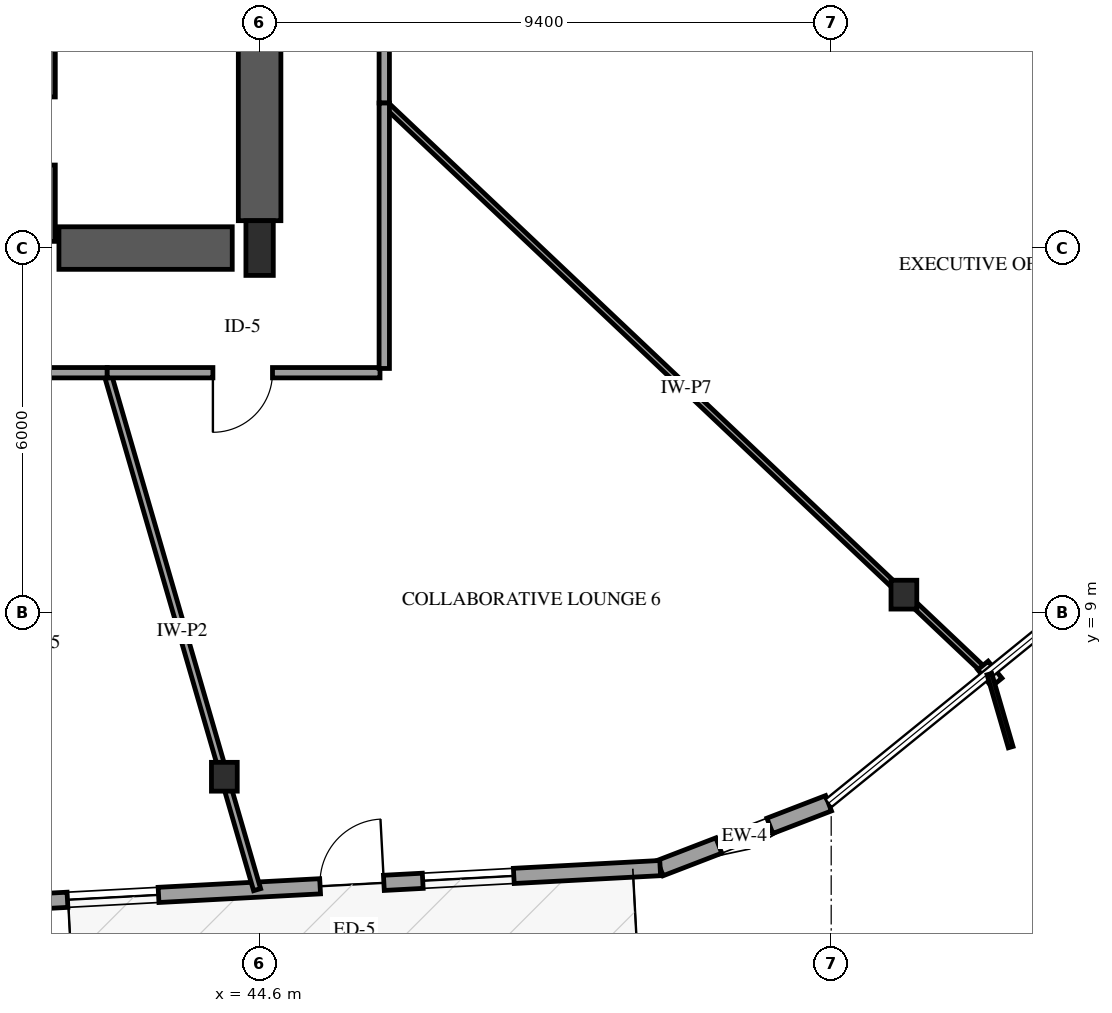
"""IFC4 building model, lengths in metres.
Left out: names, types, materials, properties, quantities, classifications, styles, units other than length and angle.
Written with IfcOpenShell. Run it as: python <this file> out.ifc"""

import sys

from ifc_helpers import new_model, si_unit, direction, frame, frame_2d, origin, origin_2d, place, context, subcontext, project, spatial, rectangle, i_section, extrude, element, fill, save


model = new_model("IFC4")
c1 = context("Model", 3, precision=1e-05, world=origin(), true_north=direction((0.0, 1.0)))
c2 = subcontext(c1, "Body", "Model", "MODEL_VIEW")
j1 = project(units=[si_unit("LENGTHUNIT", "METRE"), si_unit("PLANEANGLEUNIT", "RADIAN")], contexts=[c1])
p1 = place(None, origin())
s1 = spatial("IfcSite", under=j1, at=p1, CompositionType="ELEMENT")
p2 = place(p1, origin())
s2 = spatial("IfcBuilding", under=s1, at=p2, CompositionType="ELEMENT")
p3 = place(p2, frame((0.0, 0.0, 38.6)))
s3 = spatial("IfcBuildingStorey", under=s2, at=p3, CompositionType="ELEMENT", Elevation=38.6)
p4 = place(p3, frame((41.12, 15.11, 0.0), z_axis=(0.0, 0.0, 1.0), x_axis=(0.0, 1.0, 0.0)))
e1 = element("IfcWall", 1, at=p4, inside=s3, PredefinedType="SHEAR", context=c2, shape_type="SweptSolid", body=[
    extrude(rectangle(XDim=3.63, YDim=0.24, at=frame_2d((1.815, 0.0))), origin(), (0.0, 0.0, 1.0), 4.0),
])
p5 = place(p4, frame((1.255, 0.0, 0.0)))
e2 = element("IfcOpeningElement", 2, at=p5, cuts=e1, PredefinedType="OPENING", context=c2, shape_type="SweptSolid", body=[
    extrude(rectangle(XDim=1.12, YDim=2.15, at=frame_2d((0.56, 1.075))), frame((0.0, 0.13, 0.0), z_axis=(0.0, -1.0, 0.0), x_axis=(1.0, 0.0, 0.0)), (0.0, 0.0, 1.0), 0.26),
])
p6 = place(p3, frame((41.3, 15.0, 0.0), z_axis=(0.0, 0.0, 1.0), x_axis=(1.0, 0.0, 0.0)))
e3 = element("IfcWall", 3, at=p6, inside=s3, PredefinedType="SHEAR", context=c2, shape_type="SweptSolid", body=[
    extrude(rectangle(XDim=2.85, YDim=0.7, at=frame_2d((1.425, 0.0))), origin(), (0.0, 0.0, 1.0), 4.0),
])
p7 = place(p3, frame((44.6, 15.45, 0.0), z_axis=(0.0, 0.0, 1.0), x_axis=(0.0, 1.0, 0.0)))
e4 = element("IfcWall", 4, at=p7, inside=s3, PredefinedType="SHEAR", context=c2, shape_type="SweptSolid", body=[
    extrude(rectangle(XDim=6.35, YDim=0.7, at=frame_2d((3.175, 0.0))), origin(), (0.0, 0.0, 1.0), 4.0),
])
p8 = place(p3, frame((44.6, 15.0, 0.0), z_axis=(0.0, 0.0, 1.0), x_axis=(1.0, 0.0, 0.0)))
e5 = element("IfcColumn", 5, at=p8, inside=s3, PredefinedType="PILASTER", context=c2, shape_type="SweptSolid", body=[
    extrude(rectangle(XDim=0.45, YDim=0.9, at=origin_2d()), origin(), (0.0, 0.0, 1.0), 4.0),
])
for number, where, z_axis, x_axis in (
    (6, (44.02, 6.306, 0.0), (0.0, 0.0, 1.0), (1.0, 0.0, 0.0)),
    (7, (55.196, 9.3, 0.0), (0.0, 0.0, 1.0), (1.0, 0.0, 0.0)),
):
    element("IfcColumn", number, at=place(p3, frame(where, z_axis=z_axis, x_axis=x_axis)), inside=s3, PredefinedType="COLUMN", context=c2, shape_type="SweptSolid", body=[
        extrude(i_section(OverallWidth=0.424, OverallDepth=0.474, WebThickness=0.048, FlangeThickness=0.077, FilletRadius=0.038, at=origin_2d()), origin(), (0.0, 0.0, 1.0), 4.0),
    ])
p9 = place(p3, frame((51.188, 4.803, 0.0), z_axis=(0.0, 0.0, 1.0), x_axis=(0.933222533465, 0.35929890486, 0.0)))
e8 = element("IfcWall", 8, at=p9, inside=s3, PredefinedType="SOLIDWALL", context=c2, shape_type="SweptSolid", body=[
    extrude(rectangle(XDim=2.967, YDim=0.27, at=frame_2d((1.483, 0.0))), origin(), (0.0, 0.0, 1.0), 3.079),
])
p10 = place(p9, frame((1.033, 0.0, 0.75)))
e9 = element("IfcOpeningElement", 9, at=p10, cuts=e8, PredefinedType="OPENING", context=c2, shape_type="SweptSolid", body=[
    extrude(rectangle(XDim=0.9, YDim=1.5, at=frame_2d((0.45, 0.75))), frame((0.0, 0.145, 0.0), z_axis=(0.0, -1.0, 0.0), x_axis=(1.0, 0.0, 0.0)), (0.0, 0.0, 1.0), 0.29),
])
p11 = place(p3, frame((41.001, 4.259, 0.0), z_axis=(0.0, 0.0, 1.0), x_axis=(0.998573514947, 0.053394149934, 0.0)))
e10 = element("IfcWall", 10, at=p11, inside=s3, PredefinedType="SOLIDWALL", context=c2, shape_type="SweptSolid", body=[
    extrude(rectangle(XDim=10.201, YDim=0.25, at=frame_2d((5.101, 0.0))), origin(), (0.0, 0.0, 1.0), 3.079),
])
p12 = place(p11, frame((4.601, 0.0, 0.0)))
e11 = element("IfcOpeningElement", 11, at=p12, cuts=e10, PredefinedType="OPENING", context=c2, shape_type="SweptSolid", body=[
    extrude(rectangle(XDim=1.05, YDim=2.15, at=frame_2d((0.525, 1.075))), frame((0.0, 0.135, 0.0), z_axis=(0.0, -1.0, 0.0), x_axis=(1.0, 0.0, 0.0)), (0.0, 0.0, 1.0), 0.27),
])
p13 = place(p11, frame((0.44, 0.0, 0.72)))
e12 = element("IfcOpeningElement", 12, at=p13, cuts=e10, PredefinedType="OPENING", context=c2, shape_type="SweptSolid", body=[
    extrude(rectangle(XDim=1.5, YDim=1.7, at=frame_2d((0.75, 0.85))), frame((0.0, 0.135, 0.0), z_axis=(0.0, -1.0, 0.0), x_axis=(1.0, 0.0, 0.0)), (0.0, 0.0, 1.0), 0.27),
])
p14 = place(p11, frame((6.291, 0.0, 0.72)))
e13 = element("IfcOpeningElement", 13, at=p14, cuts=e10, PredefinedType="OPENING", context=c2, shape_type="SweptSolid", body=[
    extrude(rectangle(XDim=1.5, YDim=1.7, at=frame_2d((0.75, 0.85))), frame((0.0, 0.135, 0.0), z_axis=(0.0, -1.0, 0.0), x_axis=(1.0, 0.0, 0.0)), (0.0, 0.0, 1.0), 0.27),
])
p15 = place(p3, frame((46.65, 22.738, 0.0), z_axis=(0.0, 0.0, 1.0), x_axis=(0.962721450878, -0.270494746752, 0.0)))
e14 = element("IfcWall", 14, at=p15, inside=s3, PredefinedType="PARTITIONING", context=c2, shape_type="SweptSolid", body=[
    extrude(rectangle(XDim=18.322, YDim=0.11, at=frame_2d((9.161, 0.0))), origin(), (0.0, 0.0, 1.0), 2.995),
])
p16 = place(p3, frame((46.65, 17.385, 0.0), z_axis=(0.0, 0.0, 1.0), x_axis=(0.726419713392, -0.687251336845, 0.0)))
e15 = element("IfcWall", 15, at=p16, inside=s3, PredefinedType="PARTITIONING", context=c2, shape_type="SweptSolid", body=[
    extrude(rectangle(XDim=13.663, YDim=0.1, at=frame_2d((6.832, 0.0))), origin(), (0.0, 0.0, 1.0), 2.995),
])
p17 = place(p3, frame((42.094, 12.95, 0.0), z_axis=(0.0, 0.0, 1.0), x_axis=(0.27850409571, -0.96043504136, 0.0)))
e16 = element("IfcWall", 16, at=p17, inside=s3, PredefinedType="PARTITIONING", context=c2, shape_type="SweptSolid", body=[
    extrude(rectangle(XDim=8.851, YDim=0.12, at=frame_2d((4.426, 0.0))), origin(), (0.0, 0.0, 1.0), 2.995),
])
p18 = place(p3, frame((42.094, 12.95, 0.0), z_axis=(0.0, 0.0, 1.0), x_axis=(-1.0, 0.0, 0.0)))
e17 = element("IfcWall", 17, at=p18, inside=s3, PredefinedType="PARTITIONING", context=c2, shape_type="SweptSolid", body=[
    extrude(rectangle(XDim=7.951, YDim=0.17, at=frame_2d((3.976, 0.0))), origin(), (0.0, 0.0, 1.0), 3.7),
])
p19 = place(p18, frame((3.501, 0.0, 0.0)))
e18 = element("IfcOpeningElement", 18, at=p19, cuts=e17, PredefinedType="OPENING", context=c2, shape_type="SweptSolid", body=[
    extrude(rectangle(XDim=0.98, YDim=2.15, at=frame_2d((0.49, 1.075))), frame((0.0, 0.095, 0.0), z_axis=(0.0, -1.0, 0.0), x_axis=(1.0, 0.0, 0.0)), (0.0, 0.0, 1.0), 0.19),
])
p20 = place(p3, frame((46.65, 22.738, 0.0), z_axis=(0.0, 0.0, 1.0), x_axis=(0.0, -1.0, 0.0)))
e19 = element("IfcWall", 19, at=p20, inside=s3, PredefinedType="PARTITIONING", context=c2, shape_type="SweptSolid", body=[
    extrude(rectangle(XDim=5.353, YDim=0.17, at=frame_2d((2.677, 0.0))), origin(), (0.0, 0.0, 1.0), 3.7),
])
p21 = place(p20, frame((2.201, 0.0, 0.0)))
e20 = element("IfcOpeningElement", 20, at=p21, cuts=e19, PredefinedType="OPENING", context=c2, shape_type="SweptSolid", body=[
    extrude(rectangle(XDim=0.98, YDim=2.15, at=frame_2d((0.49, 1.075))), frame((0.0, 0.095, 0.0), z_axis=(0.0, -1.0, 0.0), x_axis=(1.0, 0.0, 0.0)), (0.0, 0.0, 1.0), 0.19),
])
p22 = place(p3, frame((46.58, 12.95, 0.0), z_axis=(0.0, 0.0, 1.0), x_axis=(-1.0, 0.0, 0.0)))
e21 = element("IfcWall", 21, at=p22, inside=s3, PredefinedType="PARTITIONING", context=c2, shape_type="SweptSolid", body=[
    extrude(rectangle(XDim=4.486, YDim=0.17, at=frame_2d((2.243, 0.0))), origin(), (0.0, 0.0, 1.0), 3.7),
])
p23 = place(p22, frame((1.768, 0.0, 0.0)))
e22 = element("IfcOpeningElement", 22, at=p23, cuts=e21, PredefinedType="OPENING", context=c2, shape_type="SweptSolid", body=[
    extrude(rectangle(XDim=0.98, YDim=2.15, at=frame_2d((0.49, 1.075))), frame((0.0, 0.095, 0.0), z_axis=(0.0, -1.0, 0.0), x_axis=(1.0, 0.0, 0.0)), (0.0, 0.0, 1.0), 0.19),
])
p24 = place(p3, frame((46.65, 17.385, 0.0), z_axis=(0.0, 0.0, 1.0), x_axis=(0.0, -1.0, 0.0)))
e23 = element("IfcWall", 23, at=p24, inside=s3, PredefinedType="PARTITIONING", context=c2, shape_type="SweptSolid", body=[
    extrude(rectangle(XDim=4.365, YDim=0.17, at=frame_2d((2.183, 0.0))), origin(), (0.0, 0.0, 1.0), 3.7),
])
p25 = place(p10, origin())
e24 = element("IfcWindow", 24, at=p25, inside=s3, PartitioningType="SINGLE_PANEL", PredefinedType="WINDOW", context=c2, shape_type="SweptSolid", body=[
    extrude(rectangle(XDim=0.9, YDim=1.5, at=frame_2d((0.45, 0.75))), frame((0.0, 0.03, 0.0), z_axis=(0.0, -1.0, 0.0), x_axis=(1.0, 0.0, 0.0)), (0.0, 0.0, 1.0), 0.06),
])
fill(e9, e24)
p26 = place(p12, origin())
e25 = element("IfcDoor", 25, at=p26, inside=s3, OperationType="SINGLE_SWING_RIGHT", PredefinedType="DOOR", context=c2, shape_type="SweptSolid", body=[
    extrude(rectangle(XDim=1.05, YDim=2.15, at=frame_2d((0.525, 1.075))), frame((0.0, 0.025, 0.0), z_axis=(0.0, -1.0, 0.0), x_axis=(1.0, 0.0, 0.0)), (0.0, 0.0, 1.0), 0.05),
])
fill(e11, e25)
p27 = place(p13, origin())
e26 = element("IfcWindow", 26, at=p27, inside=s3, PartitioningType="SINGLE_PANEL", PredefinedType="WINDOW", context=c2, shape_type="SweptSolid", body=[
    extrude(rectangle(XDim=1.5, YDim=1.7, at=frame_2d((0.75, 0.85))), frame((0.0, 0.03, 0.0), z_axis=(0.0, -1.0, 0.0), x_axis=(1.0, 0.0, 0.0)), (0.0, 0.0, 1.0), 0.06),
])
fill(e12, e26)
p28 = place(p14, origin())
e27 = element("IfcWindow", 27, at=p28, inside=s3, PartitioningType="SINGLE_PANEL", PredefinedType="WINDOW", context=c2, shape_type="SweptSolid", body=[
    extrude(rectangle(XDim=1.5, YDim=1.7, at=frame_2d((0.75, 0.85))), frame((0.0, 0.03, 0.0), z_axis=(0.0, -1.0, 0.0), x_axis=(1.0, 0.0, 0.0)), (0.0, 0.0, 1.0), 0.06),
])
fill(e13, e27)
p29 = place(p23, origin())
e28 = element("IfcDoor", 28, at=p29, inside=s3, OperationType="SINGLE_SWING_RIGHT", PredefinedType="DOOR", context=c2, shape_type="SweptSolid", body=[
    extrude(rectangle(XDim=0.98, YDim=2.15, at=frame_2d((0.49, 1.075))), frame((0.0, 0.025, 0.0), z_axis=(0.0, -1.0, 0.0), x_axis=(1.0, 0.0, 0.0)), (0.0, 0.0, 1.0), 0.05),
])
fill(e22, e28)
save(model, sys.argv[1])
